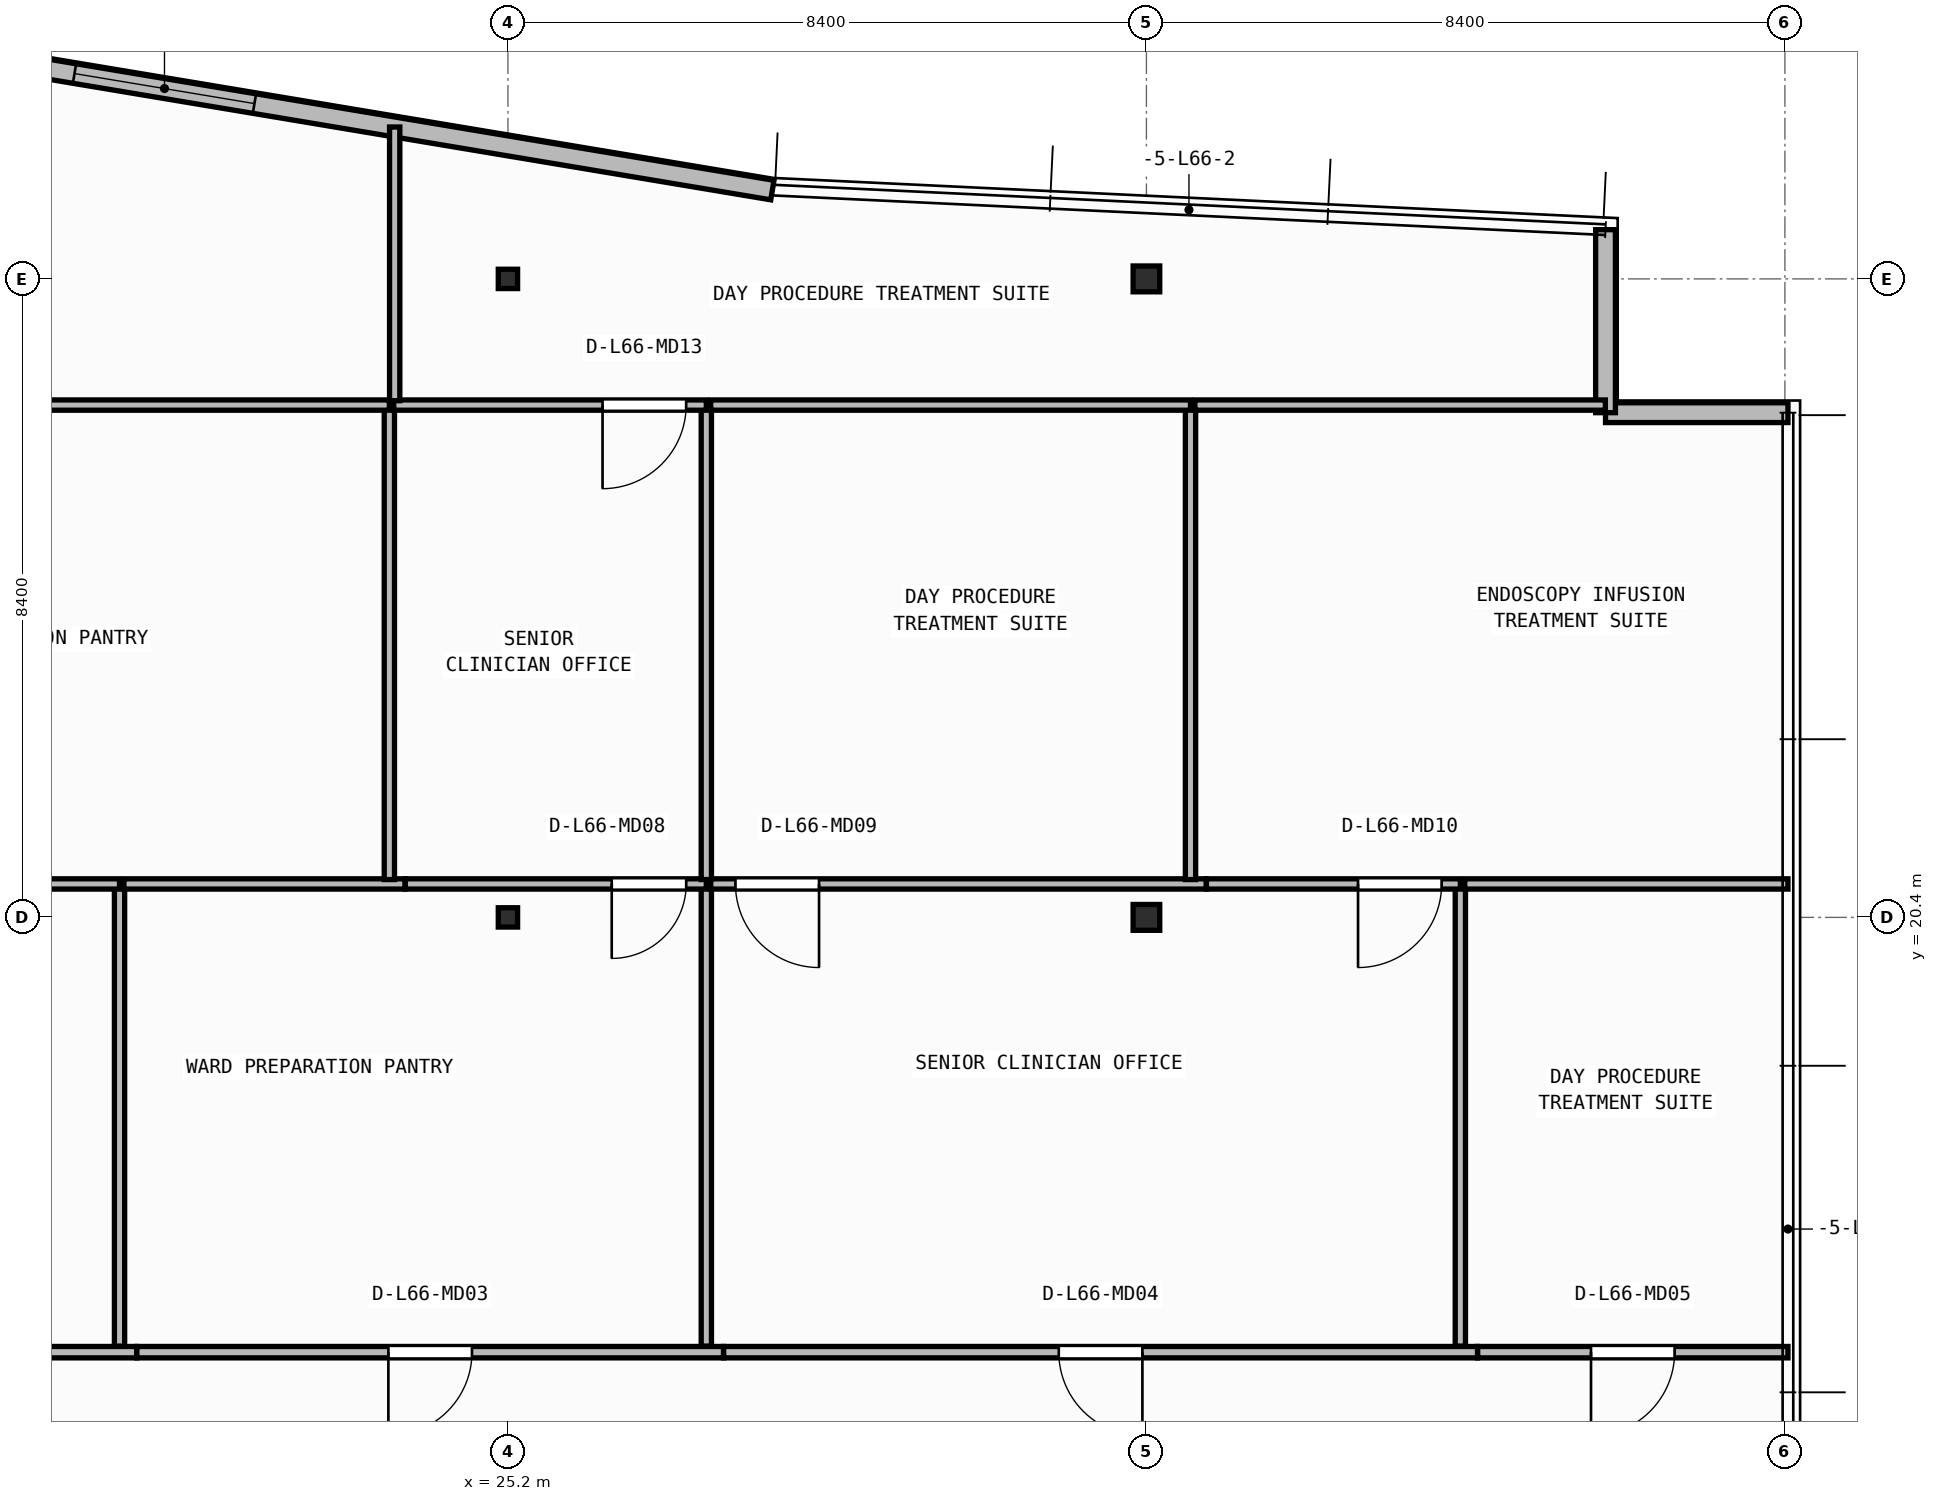
"""IFC4 building model, lengths in metres.
Left out: names, types, materials, properties, quantities, classifications, styles, units other than length and angle.
Written with IfcOpenShell. Run it as: python <this file> out.ifc"""

import sys

from ifc_helpers import new_model, si_unit, direction, frame, frame_2d, origin, origin_2d, place, context, subcontext, project, spatial, rectangle, i_section, extrude, element, fill, save


model = new_model("IFC4")
c1 = context("Model", 3, precision=1e-05, world=origin(), true_north=direction((0.0, 1.0)))
c2 = subcontext(c1, "Body", "Model", "MODEL_VIEW")
j1 = project(units=[si_unit("LENGTHUNIT", "METRE"), si_unit("PLANEANGLEUNIT", "RADIAN")], contexts=[c1])
p1 = place(None, origin())
s1 = spatial("IfcSite", under=j1, at=p1, CompositionType="ELEMENT")
p2 = place(p1, origin())
s2 = spatial("IfcBuilding", under=s1, at=p2, CompositionType="ELEMENT")
p3 = place(p2, frame((0.0, 0.0, 268.4)))
s3 = spatial("IfcBuildingStorey", under=s2, at=p3, CompositionType="ELEMENT", Elevation=268.4)
p4 = place(p3, frame((25.2, 20.4, 0.0), z_axis=(0.0, 0.0, 1.0), x_axis=(1.0, 0.0, 0.0)))
e1 = element("IfcColumn", 1, at=p4, inside=s3, PredefinedType="COLUMN", context=c2, shape_type="SweptSolid", body=[
    extrude(i_section(OverallWidth=0.254, OverallDepth=0.254, WebThickness=0.009, FlangeThickness=0.014, FilletRadius=0.013, at=origin_2d()), origin(), (0.0, 0.0, 1.0), 3.95),
])
p5 = place(p3, frame((33.6, 20.4, 0.0), z_axis=(0.0, 0.0, 1.0), x_axis=(1.0, 0.0, 0.0)))
e2 = element("IfcColumn", 2, at=p5, inside=s3, PredefinedType="COLUMN", context=c2, shape_type="SweptSolid", body=[
    extrude(i_section(OverallWidth=0.35, OverallDepth=0.34, WebThickness=0.016, FlangeThickness=0.028, at=origin_2d()), origin(), (0.0, 0.0, 1.0), 3.95),
])
p6 = place(p3, frame((25.2, 28.8, 0.0), z_axis=(0.0, 0.0, 1.0), x_axis=(1.0, 0.0, 0.0)))
e3 = element("IfcColumn", 3, at=p6, inside=s3, PredefinedType="COLUMN", context=c2, shape_type="SweptSolid", body=[
    extrude(i_section(OverallWidth=0.254, OverallDepth=0.254, WebThickness=0.009, FlangeThickness=0.014, FilletRadius=0.013, at=origin_2d()), origin(), (0.0, 0.0, 1.0), 3.95),
])
p7 = place(p3, frame((33.6, 28.8, 0.0), z_axis=(0.0, 0.0, 1.0), x_axis=(1.0, 0.0, 0.0)))
e4 = element("IfcColumn", 4, at=p7, inside=s3, PredefinedType="COLUMN", context=c2, shape_type="SweptSolid", body=[
    extrude(i_section(OverallWidth=0.35, OverallDepth=0.34, WebThickness=0.016, FlangeThickness=0.028, at=origin_2d()), origin(), (0.0, 0.0, 1.0), 3.95),
])
p8 = place(p3, frame((42.04, 27.04, 0.0), z_axis=(0.0, 0.0, 1.0), x_axis=(-1.0, 0.0, 0.0)))
e5 = element("IfcWall", 5, at=p8, inside=s3, PredefinedType="STANDARD", context=c2, shape_type="SweptSolid", body=[
    extrude(rectangle(XDim=2.4, YDim=0.26, at=frame_2d((1.2, 0.0))), origin(), (0.0, 0.0, 1.0), 3.71),
])
p9 = place(p3, frame((39.64, 27.04, 0.0), z_axis=(0.0, 0.0, 1.0), x_axis=(0.0, 1.0, 0.0)))
e6 = element("IfcWall", 6, at=p9, inside=s3, PredefinedType="STANDARD", context=c2, shape_type="SweptSolid", body=[
    extrude(rectangle(XDim=2.407, YDim=0.26, at=frame_2d((1.204, 0.0))), origin(), (0.0, 0.0, 1.0), 3.71),
])
p10 = place(p3, frame((28.679, 29.969, 0.0), z_axis=(0.0, 0.0, 1.0), x_axis=(-0.986343023061, 0.164704100918, 0.0)))
e7 = element("IfcWall", 7, at=p10, inside=s3, PredefinedType="STANDARD", context=c2, shape_type="SweptSolid", body=[
    extrude(rectangle(XDim=11.159, YDim=0.26, at=frame_2d((5.579, 0.0))), origin(), (0.0, 0.0, 1.0), 3.71),
])
p11 = place(p10, frame((6.908, 0.0, 0.9)))
e8 = element("IfcOpeningElement", 8, at=p11, cuts=e7, PredefinedType="OPENING", context=c2, shape_type="SweptSolid", body=[
    extrude(rectangle(XDim=2.4, YDim=1.65, at=frame_2d((1.2, 0.825))), frame((0.0, 0.14, 0.0), z_axis=(0.0, -1.0, 0.0), x_axis=(1.0, 0.0, 0.0)), (0.0, 0.0, 1.0), 0.28),
])
p12 = place(p3, frame((20.316, 14.68, 0.0), z_axis=(0.0, 0.0, 1.0), x_axis=(-1.0, 0.0, 0.0)))
e9 = element("IfcWall", 9, at=p12, inside=s3, PredefinedType="PARTITIONING", context=c2, shape_type="SweptSolid", body=[
    extrude(rectangle(XDim=6.762, YDim=0.15, at=frame_2d((3.381, 0.0))), origin(), (0.0, 0.0, 1.0), 3.71),
])
p13 = place(p12, frame((2.831, 0.0, 0.0)))
e10 = element("IfcOpeningElement", 10, at=p13, cuts=e9, PredefinedType="OPENING", context=c2, shape_type="SweptSolid", body=[
    extrude(rectangle(XDim=1.1, YDim=2.1, at=frame_2d((0.55, 1.05))), frame((0.0, 0.085, 0.0), z_axis=(0.0, -1.0, 0.0), x_axis=(1.0, 0.0, 0.0)), (0.0, 0.0, 1.0), 0.17),
])
p14 = place(p3, frame((28.036, 14.68, 0.0), z_axis=(0.0, 0.0, 1.0), x_axis=(-1.0, 0.0, 0.0)))
e11 = element("IfcWall", 11, at=p14, inside=s3, PredefinedType="PARTITIONING", context=c2, shape_type="SweptSolid", body=[
    extrude(rectangle(XDim=7.718, YDim=0.15, at=frame_2d((3.859, 0.0))), origin(), (0.0, 0.0, 1.0), 3.71),
])
p15 = place(p14, frame((3.309, 0.0, 0.0)))
e12 = element("IfcOpeningElement", 12, at=p15, cuts=e11, PredefinedType="OPENING", context=c2, shape_type="SweptSolid", body=[
    extrude(rectangle(XDim=1.1, YDim=2.1, at=frame_2d((0.55, 1.05))), frame((0.0, 0.085, 0.0), z_axis=(0.0, -1.0, 0.0), x_axis=(1.0, 0.0, 0.0)), (0.0, 0.0, 1.0), 0.17),
])
p16 = place(p3, frame((37.956, 14.68, 0.0), z_axis=(0.0, 0.0, 1.0), x_axis=(-1.0, 0.0, 0.0)))
e13 = element("IfcWall", 13, at=p16, inside=s3, PredefinedType="PARTITIONING", context=c2, shape_type="SweptSolid", body=[
    extrude(rectangle(XDim=9.918, YDim=0.15, at=frame_2d((4.959, 0.0))), origin(), (0.0, 0.0, 1.0), 3.71),
])
p17 = place(p16, frame((4.409, 0.0, 0.0)))
e14 = element("IfcOpeningElement", 14, at=p17, cuts=e13, PredefinedType="OPENING", context=c2, shape_type="SweptSolid", body=[
    extrude(rectangle(XDim=1.1, YDim=2.1, at=frame_2d((0.55, 1.05))), frame((0.0, 0.085, 0.0), z_axis=(0.0, -1.0, 0.0), x_axis=(1.0, 0.0, 0.0)), (0.0, 0.0, 1.0), 0.17),
])
p18 = place(p3, frame((42.04, 14.68, 0.0), z_axis=(0.0, 0.0, 1.0), x_axis=(-1.0, 0.0, 0.0)))
e15 = element("IfcWall", 15, at=p18, inside=s3, PredefinedType="PARTITIONING", context=c2, shape_type="SweptSolid", body=[
    extrude(rectangle(XDim=4.082, YDim=0.15, at=frame_2d((2.041, 0.0))), origin(), (0.0, 0.0, 1.0), 3.71),
])
p19 = place(p18, frame((1.491, 0.0, 0.0)))
e16 = element("IfcOpeningElement", 16, at=p19, cuts=e15, PredefinedType="OPENING", context=c2, shape_type="SweptSolid", body=[
    extrude(rectangle(XDim=1.1, YDim=2.1, at=frame_2d((0.55, 1.05))), frame((0.0, 0.085, 0.0), z_axis=(0.0, -1.0, 0.0), x_axis=(1.0, 0.0, 0.0)), (0.0, 0.0, 1.0), 0.17),
])
p20 = place(p3, frame((20.09, 14.76, 0.0), z_axis=(0.0, 0.0, 1.0), x_axis=(0.0, 1.0, 0.0)))
e17 = element("IfcWall", 17, at=p20, inside=s3, PredefinedType="PARTITIONING", context=c2, shape_type="SweptSolid", body=[
    extrude(rectangle(XDim=6.08, YDim=0.135, at=frame_2d((3.04, 0.0))), origin(), (0.0, 0.0, 1.0), 3.71),
])
p21 = place(p3, frame((20.09, 20.84, 0.0), z_axis=(0.0, 0.0, 1.0), x_axis=(-1.0, 0.0, 0.0)))
e18 = element("IfcWall", 18, at=p21, inside=s3, PredefinedType="PARTITIONING", context=c2, shape_type="SweptSolid", body=[
    extrude(rectangle(XDim=6.31, YDim=0.135, at=frame_2d((3.155, 0.0))), origin(), (0.0, 0.0, 1.0), 3.157),
])
p22 = place(p3, frame((27.81, 14.76, 0.0), z_axis=(0.0, 0.0, 1.0), x_axis=(0.0, 1.0, 0.0)))
e19 = element("IfcWall", 19, at=p22, inside=s3, PredefinedType="PARTITIONING", context=c2, shape_type="SweptSolid", body=[
    extrude(rectangle(XDim=6.08, YDim=0.135, at=frame_2d((3.04, 0.0))), origin(), (0.0, 0.0, 1.0), 3.71),
])
p23 = place(p3, frame((23.847, 20.84, 0.0), z_axis=(0.0, 0.0, 1.0), x_axis=(-1.0, 0.0, 0.0)))
e20 = element("IfcWall", 20, at=p23, inside=s3, PredefinedType="PARTITIONING", context=c2, shape_type="SweptSolid", body=[
    extrude(rectangle(XDim=3.7, YDim=0.135, at=frame_2d((1.85, 0.0))), origin(), (0.0, 0.0, 1.0), 3.157),
])
p24 = place(p3, frame((27.81, 20.84, 0.0), z_axis=(0.0, 0.0, 1.0), x_axis=(-1.0, 0.0, 0.0)))
e21 = element("IfcWall", 21, at=p24, inside=s3, PredefinedType="PARTITIONING", context=c2, shape_type="SweptSolid", body=[
    extrude(rectangle(XDim=3.96, YDim=0.135, at=frame_2d((1.98, 0.0))), origin(), (0.0, 0.0, 1.0), 3.157),
])
p25 = place(p24, frame((0.264, 0.0, 0.0)))
e22 = element("IfcOpeningElement", 22, at=p25, cuts=e21, PredefinedType="OPENING", context=c2, shape_type="SweptSolid", body=[
    extrude(rectangle(XDim=0.98, YDim=2.1, at=frame_2d((0.49, 1.05))), frame((0.0, 0.077, 0.0), z_axis=(0.0, -1.0, 0.0), x_axis=(1.0, 0.0, 0.0)), (0.0, 0.0, 1.0), 0.155),
])
p26 = place(p3, frame((37.73, 14.76, 0.0), z_axis=(0.0, 0.0, 1.0), x_axis=(0.0, 1.0, 0.0)))
e23 = element("IfcWall", 23, at=p26, inside=s3, PredefinedType="PARTITIONING", context=c2, shape_type="SweptSolid", body=[
    extrude(rectangle(XDim=6.08, YDim=0.135, at=frame_2d((3.04, 0.0))), origin(), (0.0, 0.0, 1.0), 3.71),
])
p27 = place(p3, frame((34.387, 20.84, 0.0), z_axis=(0.0, 0.0, 1.0), x_axis=(-1.0, 0.0, 0.0)))
e24 = element("IfcWall", 24, at=p27, inside=s3, PredefinedType="PARTITIONING", context=c2, shape_type="SweptSolid", body=[
    extrude(rectangle(XDim=6.52, YDim=0.135, at=frame_2d((3.26, 0.0))), origin(), (0.0, 0.0, 1.0), 3.157),
])
p28 = place(p27, frame((5.094, 0.0, 0.0)))
e25 = element("IfcOpeningElement", 25, at=p28, cuts=e24, PredefinedType="OPENING", context=c2, shape_type="SweptSolid", body=[
    extrude(rectangle(XDim=1.1, YDim=2.1, at=frame_2d((0.55, 1.05))), frame((0.0, 0.077, 0.0), z_axis=(0.0, -1.0, 0.0), x_axis=(1.0, 0.0, 0.0)), (0.0, 0.0, 1.0), 0.155),
])
p29 = place(p3, frame((37.73, 20.84, 0.0), z_axis=(0.0, 0.0, 1.0), x_axis=(-1.0, 0.0, 0.0)))
e26 = element("IfcWall", 26, at=p29, inside=s3, PredefinedType="PARTITIONING", context=c2, shape_type="SweptSolid", body=[
    extrude(rectangle(XDim=3.341, YDim=0.135, at=frame_2d((1.67, 0.0))), origin(), (0.0, 0.0, 1.0), 3.71),
])
p30 = place(p29, frame((0.246, 0.0, 0.0)))
e27 = element("IfcOpeningElement", 27, at=p30, cuts=e26, PredefinedType="OPENING", context=c2, shape_type="SweptSolid", body=[
    extrude(rectangle(XDim=1.1, YDim=2.1, at=frame_2d((0.55, 1.05))), frame((0.0, 0.077, 0.0), z_axis=(0.0, -1.0, 0.0), x_axis=(1.0, 0.0, 0.0)), (0.0, 0.0, 1.0), 0.155),
])
p31 = place(p3, frame((42.04, 20.84, 0.0), z_axis=(0.0, 0.0, 1.0), x_axis=(-1.0, 0.0, 0.0)))
e28 = element("IfcWall", 28, at=p31, inside=s3, PredefinedType="PARTITIONING", context=c2, shape_type="SweptSolid", body=[
    extrude(rectangle(XDim=4.252, YDim=0.135, at=frame_2d((2.126, 0.0))), origin(), (0.0, 0.0, 1.0), 3.71),
])
p32 = place(p3, frame((23.64, 20.897, 0.0), z_axis=(0.0, 0.0, 1.0), x_axis=(0.0, 1.0, 0.0)))
e29 = element("IfcWall", 29, at=p32, inside=s3, PredefinedType="PARTITIONING", context=c2, shape_type="SweptSolid", body=[
    extrude(rectangle(XDim=6.242, YDim=0.135, at=frame_2d((3.121, 0.0))), origin(), (0.0, 0.0, 1.0), 3.71),
])
p33 = place(p3, frame((23.64, 27.14, 0.0), z_axis=(0.0, 0.0, 1.0), x_axis=(-1.0, 0.0, 0.0)))
e30 = element("IfcWall", 30, at=p33, inside=s3, PredefinedType="PARTITIONING", context=c2, shape_type="SweptSolid", body=[
    extrude(rectangle(XDim=9.86, YDim=0.135, at=frame_2d((4.93, 0.0))), origin(), (0.0, 0.0, 1.0), 3.71),
])
p34 = place(p3, frame((27.81, 20.897, 0.0), z_axis=(0.0, 0.0, 1.0), x_axis=(0.0, 1.0, 0.0)))
e31 = element("IfcWall", 31, at=p34, inside=s3, PredefinedType="PARTITIONING", context=c2, shape_type="SweptSolid", body=[
    extrude(rectangle(XDim=6.242, YDim=0.135, at=frame_2d((3.121, 0.0))), origin(), (0.0, 0.0, 1.0), 3.71),
])
p35 = place(p3, frame((27.81, 27.14, 0.0), z_axis=(0.0, 0.0, 1.0), x_axis=(-1.0, 0.0, 0.0)))
e32 = element("IfcWall", 32, at=p35, inside=s3, PredefinedType="PARTITIONING", context=c2, shape_type="SweptSolid", body=[
    extrude(rectangle(XDim=4.113, YDim=0.135, at=frame_2d((2.056, 0.0))), origin(), (0.0, 0.0, 1.0), 3.71),
])
p36 = place(p35, frame((0.265, 0.0, 0.0)))
e33 = element("IfcOpeningElement", 33, at=p36, cuts=e32, PredefinedType="OPENING", context=c2, shape_type="SweptSolid", body=[
    extrude(rectangle(XDim=1.1, YDim=2.1, at=frame_2d((0.55, 1.05))), frame((0.0, 0.077, 0.0), z_axis=(0.0, -1.0, 0.0), x_axis=(1.0, 0.0, 0.0)), (0.0, 0.0, 1.0), 0.155),
])
p37 = place(p3, frame((34.18, 20.897, 0.0), z_axis=(0.0, 0.0, 1.0), x_axis=(0.0, 1.0, 0.0)))
e34 = element("IfcWall", 34, at=p37, inside=s3, PredefinedType="PARTITIONING", context=c2, shape_type="SweptSolid", body=[
    extrude(rectangle(XDim=6.242, YDim=0.135, at=frame_2d((3.121, 0.0))), origin(), (0.0, 0.0, 1.0), 3.71),
])
p38 = place(p3, frame((34.18, 27.14, 0.0), z_axis=(0.0, 0.0, 1.0), x_axis=(-1.0, 0.0, 0.0)))
e35 = element("IfcWall", 35, at=p38, inside=s3, PredefinedType="PARTITIONING", context=c2, shape_type="SweptSolid", body=[
    extrude(rectangle(XDim=6.312, YDim=0.135, at=frame_2d((3.156, 0.0))), origin(), (0.0, 0.0, 1.0), 3.71),
])
p39 = place(p3, frame((39.638, 27.14, 0.0), z_axis=(0.0, 0.0, 1.0), x_axis=(-1.0, 0.0, 0.0)))
e36 = element("IfcWall", 36, at=p39, inside=s3, PredefinedType="PARTITIONING", context=c2, shape_type="SweptSolid", body=[
    extrude(rectangle(XDim=5.4, YDim=0.135, at=frame_2d((2.7, 0.0))), origin(), (0.0, 0.0, 1.0), 3.71),
])
p40 = place(p3, frame((23.71, 27.198, 0.0), z_axis=(0.0, 0.0, 1.0), x_axis=(0.0, 1.0, 0.0)))
e37 = element("IfcWall", 37, at=p40, inside=s3, PredefinedType="PARTITIONING", context=c2, shape_type="SweptSolid", body=[
    extrude(rectangle(XDim=3.601, YDim=0.135, at=frame_2d((1.8, 0.0))), origin(), (0.0, 0.0, 1.0), 3.71),
])
p41 = place(p11, origin())
e38 = element("IfcWindow", 38, at=p41, inside=s3, PartitioningType="SINGLE_PANEL", PredefinedType="WINDOW", context=c2, shape_type="SweptSolid", body=[
    extrude(rectangle(XDim=2.4, YDim=1.65, at=frame_2d((1.2, 0.825))), frame((0.0, 0.03, 0.0), z_axis=(0.0, -1.0, 0.0), x_axis=(1.0, 0.0, 0.0)), (0.0, 0.0, 1.0), 0.06),
])
fill(e8, e38)
p42 = place(p15, origin())
e39 = element("IfcDoor", 39, at=p42, inside=s3, OperationType="SINGLE_SWING_RIGHT", PredefinedType="DOOR", context=c2, shape_type="SweptSolid", body=[
    extrude(rectangle(XDim=1.1, YDim=2.1, at=frame_2d((0.55, 1.05))), frame((0.0, 0.025, 0.0), z_axis=(0.0, -1.0, 0.0), x_axis=(1.0, 0.0, 0.0)), (0.0, 0.0, 1.0), 0.05),
])
fill(e12, e39)
p43 = place(p17, origin())
e40 = element("IfcDoor", 40, at=p43, inside=s3, OperationType="SINGLE_SWING_LEFT", PredefinedType="DOOR", context=c2, shape_type="SweptSolid", body=[
    extrude(rectangle(XDim=1.1, YDim=2.1, at=frame_2d((0.55, 1.05))), frame((0.0, 0.025, 0.0), z_axis=(0.0, -1.0, 0.0), x_axis=(1.0, 0.0, 0.0)), (0.0, 0.0, 1.0), 0.05),
])
fill(e14, e40)
p44 = place(p19, origin())
e41 = element("IfcDoor", 41, at=p44, inside=s3, OperationType="SINGLE_SWING_RIGHT", PredefinedType="DOOR", context=c2, shape_type="SweptSolid", body=[
    extrude(rectangle(XDim=1.1, YDim=2.1, at=frame_2d((0.55, 1.05))), frame((0.0, 0.025, 0.0), z_axis=(0.0, -1.0, 0.0), x_axis=(1.0, 0.0, 0.0)), (0.0, 0.0, 1.0), 0.05),
])
fill(e16, e41)
p45 = place(p25, origin())
e42 = element("IfcDoor", 42, at=p45, inside=s3, OperationType="SINGLE_SWING_RIGHT", PredefinedType="DOOR", context=c2, shape_type="SweptSolid", body=[
    extrude(rectangle(XDim=0.98, YDim=2.1, at=frame_2d((0.49, 1.05))), frame((0.0, 0.025, 0.0), z_axis=(0.0, -1.0, 0.0), x_axis=(1.0, 0.0, 0.0)), (0.0, 0.0, 1.0), 0.05),
])
fill(e22, e42)
p46 = place(p28, origin())
e43 = element("IfcDoor", 43, at=p46, inside=s3, OperationType="SINGLE_SWING_LEFT", PredefinedType="DOOR", context=c2, shape_type="SweptSolid", body=[
    extrude(rectangle(XDim=1.1, YDim=2.1, at=frame_2d((0.55, 1.05))), frame((0.0, 0.025, 0.0), z_axis=(0.0, -1.0, 0.0), x_axis=(1.0, 0.0, 0.0)), (0.0, 0.0, 1.0), 0.05),
])
fill(e25, e43)
p47 = place(p30, origin())
e44 = element("IfcDoor", 44, at=p47, inside=s3, OperationType="SINGLE_SWING_RIGHT", PredefinedType="DOOR", context=c2, shape_type="SweptSolid", body=[
    extrude(rectangle(XDim=1.1, YDim=2.1, at=frame_2d((0.55, 1.05))), frame((0.0, 0.025, 0.0), z_axis=(0.0, -1.0, 0.0), x_axis=(1.0, 0.0, 0.0)), (0.0, 0.0, 1.0), 0.05),
])
fill(e27, e44)
p48 = place(p36, origin())
e45 = element("IfcDoor", 45, at=p48, inside=s3, OperationType="SINGLE_SWING_RIGHT", PredefinedType="DOOR", context=c2, shape_type="SweptSolid", body=[
    extrude(rectangle(XDim=1.1, YDim=2.1, at=frame_2d((0.55, 1.05))), frame((0.0, 0.025, 0.0), z_axis=(0.0, -1.0, 0.0), x_axis=(1.0, 0.0, 0.0)), (0.0, 0.0, 1.0), 0.05),
])
fill(e33, e45)
save(model, sys.argv[1])
